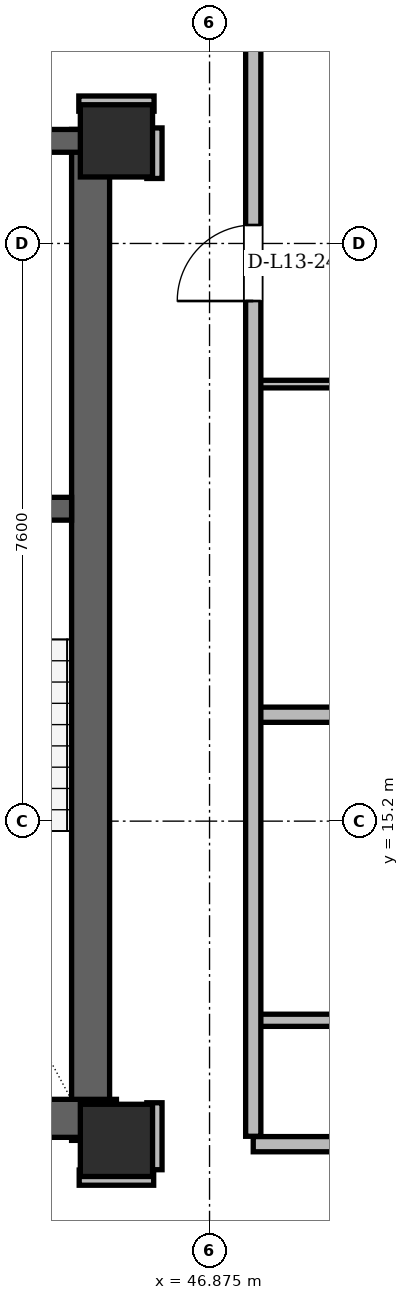
"""IFC4 building model, lengths in metres.
Left out: names, types, materials, properties, quantities, classifications, styles, units other than length and angle.
Written with IfcOpenShell. Run it as: python <this file> out.ifc"""

import sys

from ifc_helpers import new_model, si_unit, direction, frame, frame_2d, origin, origin_2d, place, context, subcontext, project, spatial, rectangle, hollow_rectangle, extrude, element, fill, save


model = new_model("IFC4")
c1 = context("Model", 3, precision=1e-05, world=origin(), true_north=direction((0.0, 1.0)))
c2 = subcontext(c1, "Body", "Model", "MODEL_VIEW")
j1 = project(units=[si_unit("LENGTHUNIT", "METRE"), si_unit("PLANEANGLEUNIT", "RADIAN")], contexts=[c1])
p1 = place(None, origin())
s1 = spatial("IfcSite", under=j1, at=p1, CompositionType="ELEMENT")
p2 = place(p1, origin())
s2 = spatial("IfcBuilding", under=s1, at=p2, CompositionType="ELEMENT")
p3 = place(p2, frame((0.0, 0.0, 52.5)))
s3 = spatial("IfcBuildingStorey", under=s2, at=p3, CompositionType="ELEMENT", Elevation=52.5)
for number, where, z_axis, x_axis in (
    (1, (45.65, 11.0, 0.0), (0.0, 0.0, 1.0), (1.0, 0.0, 0.0)),
    (2, (45.65, 24.15, 0.0), (0.0, 0.0, 1.0), (1.0, 0.0, 0.0)),
):
    element("IfcColumn", number, at=place(p3, frame(where, z_axis=z_axis, x_axis=x_axis)), inside=s3, PredefinedType="COLUMN", context=c2, shape_type="SweptSolid", body=[
        extrude(hollow_rectangle(XDim=0.95, YDim=0.95, WallThickness=0.08, at=origin_2d()), origin(), (0.0, 0.0, 1.0), 3.6),
    ])
p4 = place(p3, frame((45.31, 11.0, 0.0), z_axis=(0.0, 0.0, 1.0), x_axis=(0.0, 1.0, 0.0)))
e3 = element("IfcWall", 3, at=p4, inside=s3, PredefinedType="SHEAR", context=c2, shape_type="SweptSolid", body=[
    extrude(rectangle(XDim=13.3, YDim=0.5, at=frame_2d((6.65, 0.0))), origin(), (0.0, 0.0, 1.0), 3.36),
])
p5 = place(p3, frame((38.55, 11.29, 0.0), z_axis=(0.0, 0.0, 1.0), x_axis=(1.0, 0.0, 0.0)))
e4 = element("IfcWall", 4, at=p5, inside=s3, PredefinedType="SHEAR", context=c2, shape_type="SweptSolid", body=[
    extrude(rectangle(XDim=7.1, YDim=0.5, at=frame_2d((3.55, 0.0))), origin(), (0.0, 0.0, 1.0), 3.36),
])
p6 = place(p3, frame((29.65, 24.15, 0.0), z_axis=(0.0, 0.0, 1.0), x_axis=(1.0, 0.0, 0.0)))
e5 = element("IfcWall", 5, at=p6, inside=s3, PredefinedType="SHEAR", context=c2, shape_type="SweptSolid", body=[
    extrude(rectangle(XDim=15.7, YDim=0.3, at=frame_2d((7.85, 0.0))), origin(), (0.0, 0.0, 1.0), 3.36),
])
p7 = place(p6, frame((1.7, 0.0, 0.0)))
e6 = element("IfcOpeningElement", 6, at=p7, cuts=e5, PredefinedType="OPENING", context=c2, shape_type="SweptSolid", body=[
    extrude(rectangle(XDim=1.2, YDim=2.2, at=frame_2d((0.6, 1.1))), frame((0.0, 0.15, 0.0), z_axis=(0.0, -1.0, 0.0), x_axis=(1.0, 0.0, 0.0)), (0.0, 0.0, 1.0), 0.3),
])
p8 = place(p6, frame((12.8, 0.0, 0.0)))
e7 = element("IfcOpeningElement", 7, at=p8, cuts=e5, PredefinedType="OPENING", context=c2, shape_type="SweptSolid", body=[
    extrude(rectangle(XDim=1.2, YDim=2.2, at=frame_2d((0.6, 1.1))), frame((0.0, 0.15, 0.0), z_axis=(0.0, -1.0, 0.0), x_axis=(1.0, 0.0, 0.0)), (0.0, 0.0, 1.0), 0.3),
])
p9 = place(p6, frame((6.55, 0.0, 0.0)))
e8 = element("IfcOpeningElement", 8, at=p9, cuts=e5, PredefinedType="OPENING", context=c2, shape_type="SweptSolid", body=[
    extrude(rectangle(XDim=0.9, YDim=2.05, at=frame_2d((0.45, 1.025))), frame((0.0, 0.15, 0.0), z_axis=(0.0, -1.0, 0.0), x_axis=(1.0, 0.0, 0.0)), (0.0, 0.0, 1.0), 0.3),
])
p10 = place(p6, frame((8.45, 0.0, 0.0)))
e9 = element("IfcOpeningElement", 9, at=p10, cuts=e5, PredefinedType="OPENING", context=c2, shape_type="SweptSolid", body=[
    extrude(rectangle(XDim=0.9, YDim=2.05, at=frame_2d((0.45, 1.025))), frame((0.0, 0.15, 0.0), z_axis=(0.0, -1.0, 0.0), x_axis=(1.0, 0.0, 0.0)), (0.0, 0.0, 1.0), 0.3),
])
p11 = place(p3, frame((41.05, 19.31, 0.0), z_axis=(0.0, 0.0, 1.0), x_axis=(1.0, 0.0, 0.0)))
e10 = element("IfcWall", 10, at=p11, inside=s3, PredefinedType="SHEAR", context=c2, shape_type="SweptSolid", body=[
    extrude(rectangle(XDim=4.01, YDim=0.3, at=frame_2d((2.005, 0.0))), origin(), (0.0, 0.0, 1.0), 3.36),
])
p12 = place(p11, frame((1.6, 0.0, 0.0)))
e11 = element("IfcOpeningElement", 11, at=p12, cuts=e10, PredefinedType="OPENING", context=c2, shape_type="SweptSolid", body=[
    extrude(rectangle(XDim=1.4, YDim=2.2, at=frame_2d((0.7, 1.1))), frame((0.0, 0.15, 0.0), z_axis=(0.0, -1.0, 0.0), x_axis=(1.0, 0.0, 0.0)), (0.0, 0.0, 1.0), 0.3),
])
p13 = place(p3, frame((61.458, 14.648, 0.0), z_axis=(0.0, 0.0, 1.0), x_axis=(-0.500001264705, 0.866024673605, 0.0)))
e12 = element("IfcWall", 12, at=p13, inside=s3, PredefinedType="SOLIDWALL", context=c2, shape_type="SweptSolid", body=[
    extrude(rectangle(XDim=33.402, YDim=0.34, at=frame_2d((16.701, 0.0))), origin(), (0.0, 0.0, 1.0), 2.494),
])
p14 = place(p13, frame((7.615, 0.0, 0.0)))
e13 = element("IfcOpeningElement", 13, at=p14, cuts=e12, PredefinedType="OPENING", context=c2, shape_type="SweptSolid", body=[
    extrude(rectangle(XDim=1.5, YDim=2.2, at=frame_2d((0.75, 1.1))), frame((0.0, 0.17, 0.0), z_axis=(0.0, -1.0, 0.0), x_axis=(1.0, 0.0, 0.0)), (0.0, 0.0, 1.0), 0.34),
])
p15 = place(p13, frame((24.692, 0.0, 0.0)))
e14 = element("IfcOpeningElement", 14, at=p15, cuts=e12, PredefinedType="OPENING", context=c2, shape_type="SweptSolid", body=[
    extrude(rectangle(XDim=1.5, YDim=2.2, at=frame_2d((0.75, 1.1))), frame((0.0, 0.17, 0.0), z_axis=(0.0, -1.0, 0.0), x_axis=(1.0, 0.0, 0.0)), (0.0, 0.0, 1.0), 0.34),
])
p16 = place(p13, frame((0.899, 0.0, 0.85)))
e15 = element("IfcOpeningElement", 15, at=p16, cuts=e12, PredefinedType="OPENING", context=c2, shape_type="SweptSolid", body=[
    extrude(rectangle(XDim=1.2, YDim=1.48, at=frame_2d((0.6, 0.74))), frame((0.0, 0.17, 0.0), z_axis=(0.0, -1.0, 0.0), x_axis=(1.0, 0.0, 0.0)), (0.0, 0.0, 1.0), 0.34),
])
p17 = place(p13, frame((10.882, 0.0, 0.85)))
e16 = element("IfcOpeningElement", 16, at=p17, cuts=e12, PredefinedType="OPENING", context=c2, shape_type="SweptSolid", body=[
    extrude(rectangle(XDim=1.6, YDim=1.534, at=frame_2d((0.8, 0.767))), frame((0.0, 0.17, 0.0), z_axis=(0.0, -1.0, 0.0), x_axis=(1.0, 0.0, 0.0)), (0.0, 0.0, 1.0), 0.34),
])
p18 = place(p13, frame((18.551, 0.0, 0.85)))
e17 = element("IfcOpeningElement", 17, at=p18, cuts=e12, PredefinedType="OPENING", context=c2, shape_type="SweptSolid", body=[
    extrude(rectangle(XDim=3.0, YDim=1.534, at=frame_2d((1.5, 0.767))), frame((0.0, 0.17, 0.0), z_axis=(0.0, -1.0, 0.0), x_axis=(1.0, 0.0, 0.0)), (0.0, 0.0, 1.0), 0.34),
])
p19 = place(p13, frame((3.059, 0.0, 0.85)))
e18 = element("IfcOpeningElement", 18, at=p19, cuts=e12, PredefinedType="OPENING", context=c2, shape_type="SweptSolid", body=[
    extrude(rectangle(XDim=1.2, YDim=1.48, at=frame_2d((0.6, 0.74))), frame((0.0, 0.17, 0.0), z_axis=(0.0, -1.0, 0.0), x_axis=(1.0, 0.0, 0.0)), (0.0, 0.0, 1.0), 0.34),
])
p20 = place(p3, frame((45.16, 10.51, 0.0), z_axis=(0.0, 0.0, 1.0), x_axis=(1.0, 0.0, 0.0)))
e19 = element("IfcWall", 19, at=p20, inside=s3, PredefinedType="PARTITIONING", context=c2, shape_type="SweptSolid", body=[
    extrude(rectangle(XDim=0.98, YDim=0.2, at=frame_2d((0.49, 0.0))), origin(), (0.0, 0.0, 1.0), 2.738),
])
p21 = place(p3, frame((47.45, 10.95, 0.0), z_axis=(0.0, 0.0, 1.0), x_axis=(1.0, 0.0, 0.0)))
e20 = element("IfcWall", 20, at=p21, inside=s3, PredefinedType="PARTITIONING", context=c2, shape_type="SweptSolid", body=[
    extrude(rectangle(XDim=8.35, YDim=0.2, at=frame_2d((4.175, 0.0))), origin(), (0.0, 0.0, 1.0), 3.36),
])
p22 = place(p3, frame((47.4, 12.58, 0.0), z_axis=(0.0, 0.0, 1.0), x_axis=(1.0, 0.0, 0.0)))
e21 = element("IfcWall", 21, at=p22, inside=s3, PredefinedType="PARTITIONING", context=c2, shape_type="SweptSolid", body=[
    extrude(rectangle(XDim=12.664, YDim=0.16, at=frame_2d((6.332, 0.0))), origin(), (0.0, 0.0, 1.0), 2.738),
])
p23 = place(p22, frame((3.924, 0.0, 0.0)))
e22 = element("IfcOpeningElement", 22, at=p23, cuts=e21, PredefinedType="OPENING", context=c2, shape_type="SweptSolid", body=[
    extrude(rectangle(XDim=0.92, YDim=2.12, at=frame_2d((0.46, 1.06))), frame((0.0, 0.08, 0.0), z_axis=(0.0, -1.0, 0.0), x_axis=(1.0, 0.0, 0.0)), (0.0, 0.0, 1.0), 0.16),
])
p24 = place(p22, frame((9.299, 0.0, 0.0)))
e23 = element("IfcOpeningElement", 23, at=p24, cuts=e21, PredefinedType="OPENING", context=c2, shape_type="SweptSolid", body=[
    extrude(rectangle(XDim=0.95, YDim=2.1, at=frame_2d((0.475, 1.05))), frame((0.0, 0.08, 0.0), z_axis=(0.0, -1.0, 0.0), x_axis=(1.0, 0.0, 0.0)), (0.0, 0.0, 1.0), 0.16),
])
p25 = place(p22, frame((11.319, 0.0, 0.0)))
e24 = element("IfcOpeningElement", 24, at=p25, cuts=e21, PredefinedType="OPENING", context=c2, shape_type="SweptSolid", body=[
    extrude(rectangle(XDim=0.88, YDim=2.08, at=frame_2d((0.44, 1.04))), frame((0.0, 0.08, 0.0), z_axis=(0.0, -1.0, 0.0), x_axis=(1.0, 0.0, 0.0)), (0.0, 0.0, 1.0), 0.16),
])
p26 = place(p3, frame((47.45, 16.6, 0.0), z_axis=(0.0, 0.0, 1.0), x_axis=(1.0, 0.0, 0.0)))
e25 = element("IfcWall", 25, at=p26, inside=s3, PredefinedType="PARTITIONING", context=c2, shape_type="SweptSolid", body=[
    extrude(rectangle(XDim=12.68, YDim=0.2, at=frame_2d((6.34, 0.0))), origin(), (0.0, 0.0, 1.0), 2.494),
])
p27 = place(p3, frame((47.4, 20.95, 0.0), z_axis=(0.0, 0.0, 1.0), x_axis=(1.0, 0.0, 0.0)))
e26 = element("IfcWall", 26, at=p27, inside=s3, PredefinedType="PARTITIONING", context=c2, shape_type="SweptSolid", body=[
    extrude(rectangle(XDim=10.219, YDim=0.1, at=frame_2d((5.109, 0.0))), origin(), (0.0, 0.0, 1.0), 3.36),
])
p28 = place(p27, frame((2.703, 0.0, 0.0)))
e27 = element("IfcOpeningElement", 27, at=p28, cuts=e26, PredefinedType="OPENING", context=c2, shape_type="SweptSolid", body=[
    extrude(rectangle(XDim=0.92, YDim=2.12, at=frame_2d((0.46, 1.06))), frame((0.0, 0.05, 0.0), z_axis=(0.0, -1.0, 0.0), x_axis=(1.0, 0.0, 0.0)), (0.0, 0.0, 1.0), 0.1),
])
p29 = place(p27, frame((6.856, 0.0, 0.0)))
e28 = element("IfcOpeningElement", 28, at=p29, cuts=e26, PredefinedType="OPENING", context=c2, shape_type="SweptSolid", body=[
    extrude(rectangle(XDim=0.95, YDim=2.1, at=frame_2d((0.475, 1.05))), frame((0.0, 0.05, 0.0), z_axis=(0.0, -1.0, 0.0), x_axis=(1.0, 0.0, 0.0)), (0.0, 0.0, 1.0), 0.1),
])
p30 = place(p27, frame((8.876, 0.0, 0.0)))
e29 = element("IfcOpeningElement", 29, at=p30, cuts=e26, PredefinedType="OPENING", context=c2, shape_type="SweptSolid", body=[
    extrude(rectangle(XDim=0.88, YDim=2.08, at=frame_2d((0.44, 1.04))), frame((0.0, 0.05, 0.0), z_axis=(0.0, -1.0, 0.0), x_axis=(1.0, 0.0, 0.0)), (0.0, 0.0, 1.0), 0.1),
])
p31 = place(p3, frame((45.155, 24.64, 0.0), z_axis=(0.0, 0.0, 1.0), x_axis=(1.0, 0.0, 0.0)))
e30 = element("IfcWall", 30, at=p31, inside=s3, PredefinedType="PARTITIONING", context=c2, shape_type="SweptSolid", body=[
    extrude(rectangle(XDim=0.99, YDim=0.2, at=frame_2d((0.495, 0.0))), origin(), (0.0, 0.0, 1.0), 2.738),
])
p32 = place(p3, frame((46.15, 10.614, 0.0), z_axis=(0.0, 0.0, 1.0), x_axis=(0.0, 1.0, 0.0)))
e31 = element("IfcWall", 31, at=p32, inside=s3, PredefinedType="PARTITIONING", context=c2, shape_type="SweptSolid", body=[
    extrude(rectangle(XDim=0.881, YDim=0.2, at=frame_2d((0.44, 0.0))), origin(), (0.0, 0.0, 1.0), 2.738),
])
p33 = place(p3, frame((46.15, 23.655, 0.0), z_axis=(0.0, 0.0, 1.0), x_axis=(0.0, 1.0, 0.0)))
e32 = element("IfcWall", 32, at=p33, inside=s3, PredefinedType="PARTITIONING", context=c2, shape_type="SweptSolid", body=[
    extrude(rectangle(XDim=0.665, YDim=0.2, at=frame_2d((0.333, 0.0))), origin(), (0.0, 0.0, 1.0), 2.946),
])
p34 = place(p3, frame((47.45, 11.054, 0.0), z_axis=(0.0, 0.0, 1.0), x_axis=(0.0, 1.0, 0.0)))
e33 = element("IfcWall", 33, at=p34, inside=s3, PredefinedType="PARTITIONING", context=c2, shape_type="SweptSolid", body=[
    extrude(rectangle(XDim=27.509, YDim=0.2, at=frame_2d((13.754, 0.0))), origin(), (0.0, 0.0, 1.0), 2.494),
])
p35 = place(p34, frame((10.989, 0.0, 0.0)))
e34 = element("IfcOpeningElement", 34, at=p35, cuts=e33, PredefinedType="OPENING", context=c2, shape_type="SweptSolid", body=[
    extrude(rectangle(XDim=1.0, YDim=2.18, at=frame_2d((0.5, 1.09))), frame((0.0, 0.1, 0.0), z_axis=(0.0, -1.0, 0.0), x_axis=(1.0, 0.0, 0.0)), (0.0, 0.0, 1.0), 0.2),
])
p36 = place(p35, origin())
e35 = element("IfcDoor", 35, at=p36, inside=s3, OperationType="SINGLE_SWING_LEFT", PredefinedType="DOOR", context=c2, shape_type="SweptSolid", body=[
    extrude(rectangle(XDim=1.0, YDim=2.18, at=frame_2d((0.5, 1.09))), frame((0.0, 0.025, 0.0), z_axis=(0.0, -1.0, 0.0), x_axis=(1.0, 0.0, 0.0)), (0.0, 0.0, 1.0), 0.05),
])
fill(e34, e35)
save(model, sys.argv[1])
